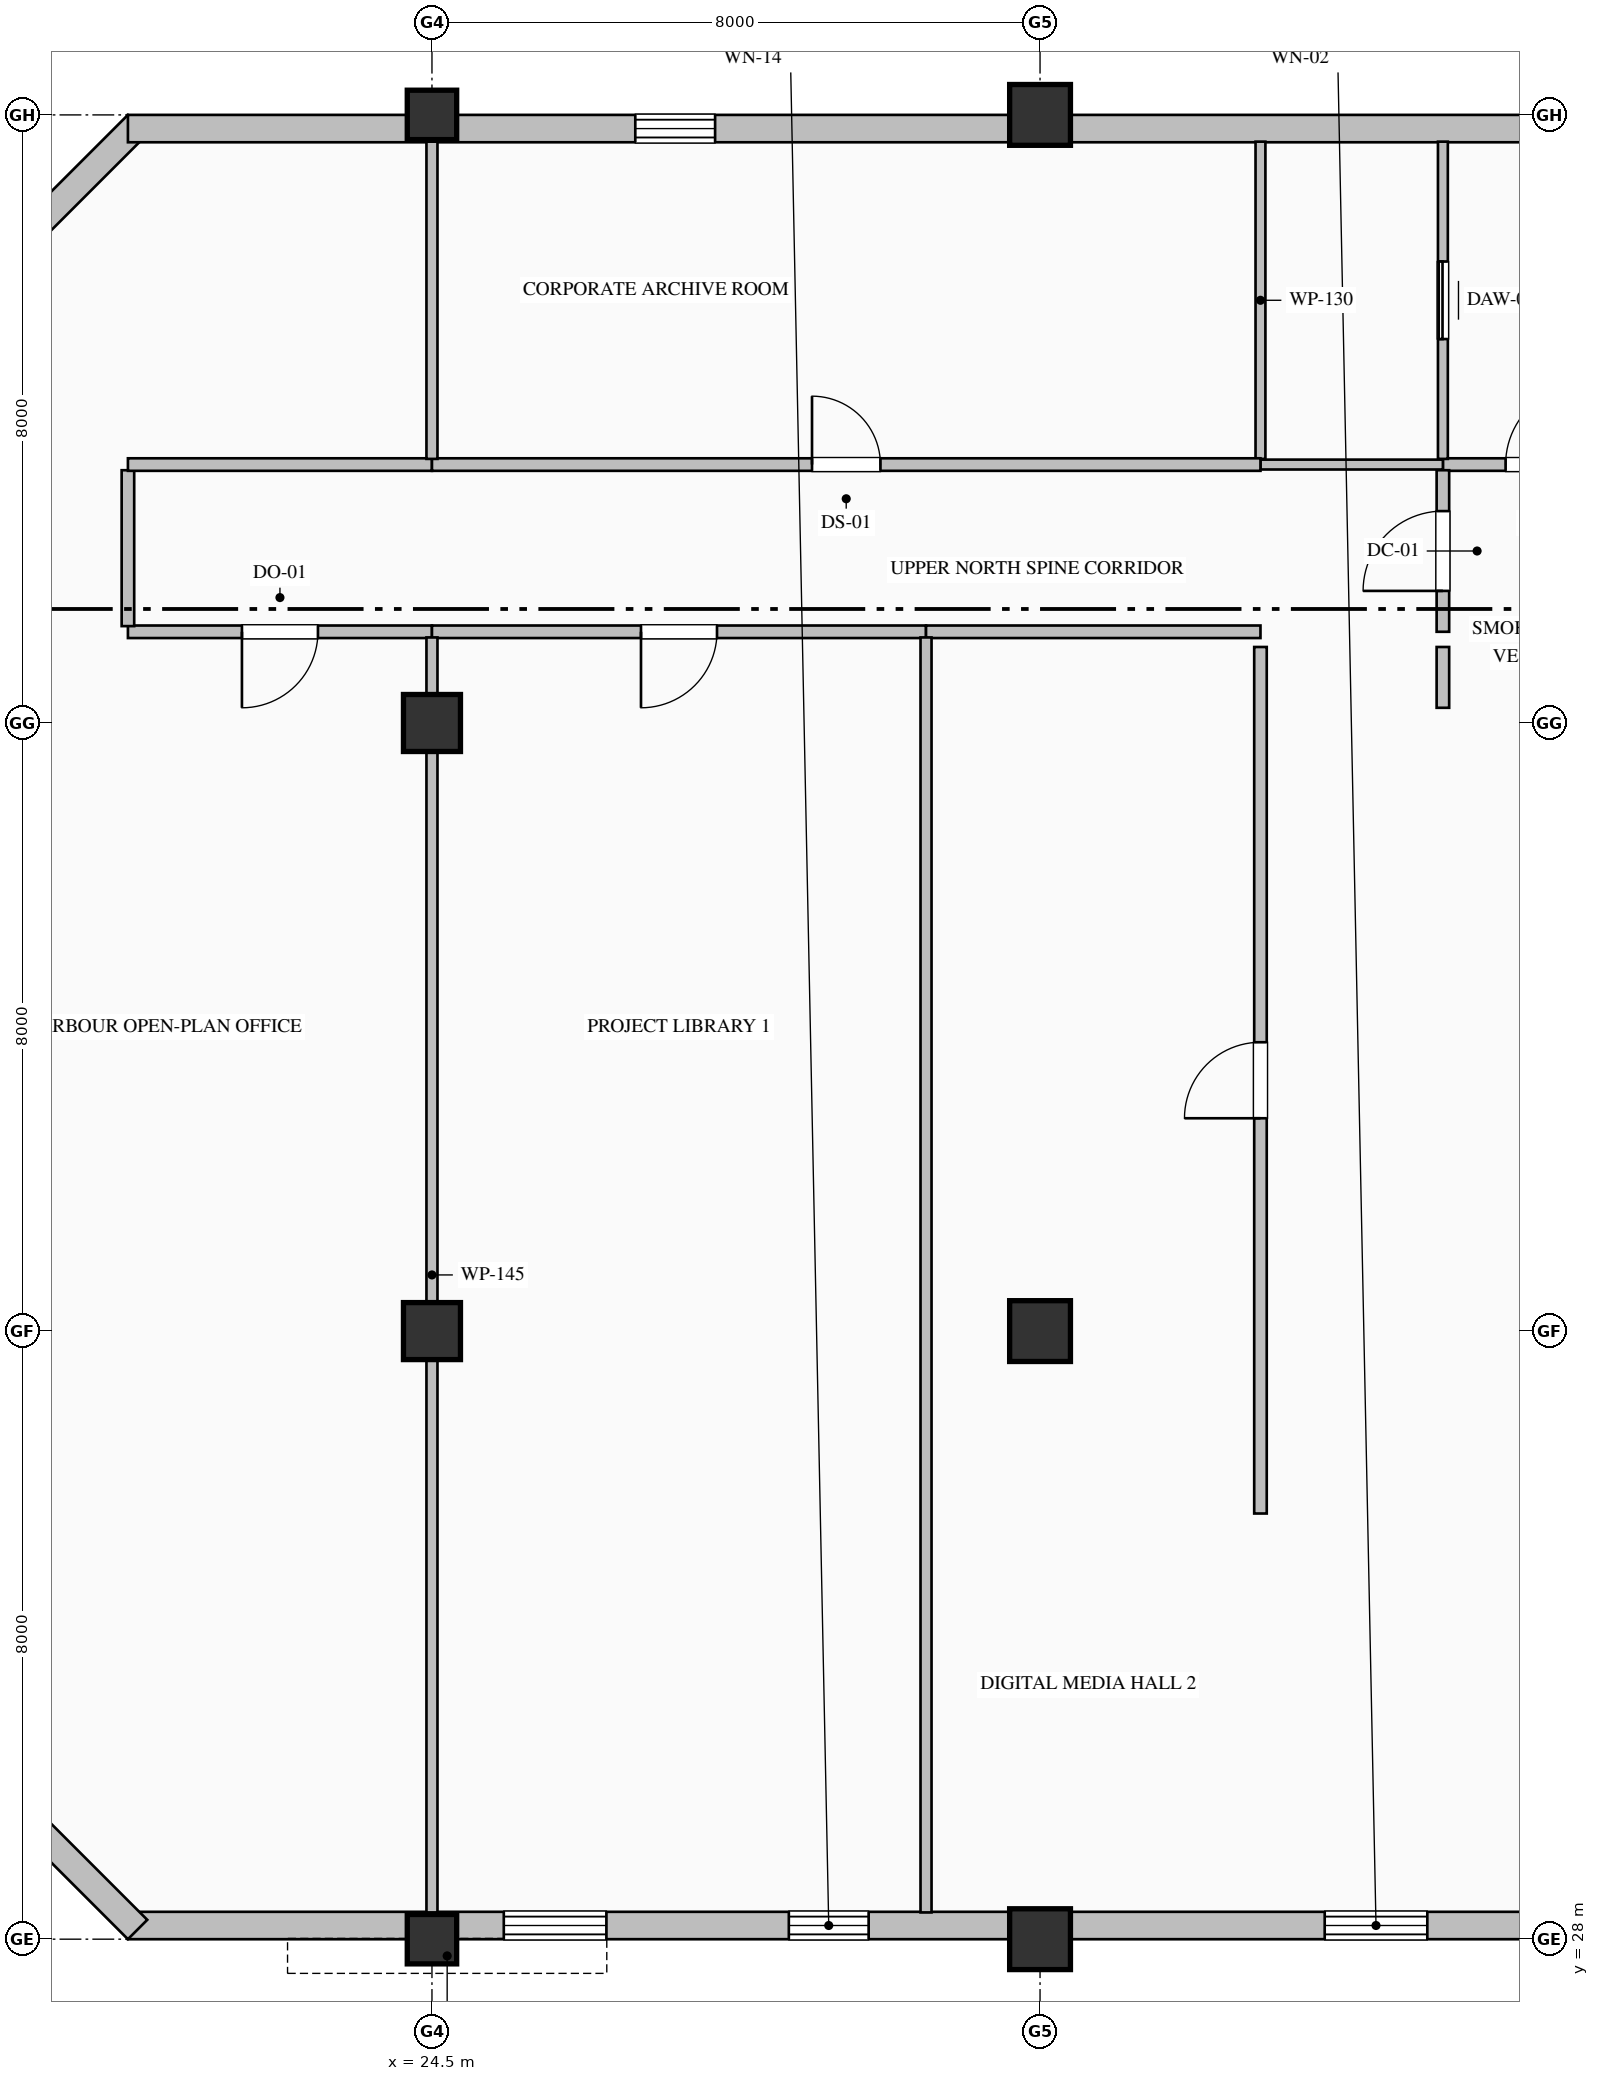
"""IFC4 building model, lengths in metres.
Left out: names, types, materials, properties, quantities, classifications, styles, units other than length and angle.
Written with IfcOpenShell. Run it as: python <this file> out.ifc"""

import sys

from ifc_helpers import new_model, si_unit, direction, frame, frame_2d, origin, origin_2d, place, context, subcontext, project, spatial, rectangle, hollow_rectangle, extrude, element, fill, save


model = new_model("IFC4")
c1 = context("Model", 3, precision=1e-05, world=origin(), true_north=direction((0.0, 1.0)))
c2 = subcontext(c1, "Body", "Model", "MODEL_VIEW")
j1 = project(units=[si_unit("LENGTHUNIT", "METRE"), si_unit("PLANEANGLEUNIT", "RADIAN")], contexts=[c1])
p1 = place(None, origin())
s1 = spatial("IfcSite", under=j1, at=p1, CompositionType="ELEMENT")
p2 = place(p1, origin())
s2 = spatial("IfcBuilding", under=s1, at=p2, CompositionType="ELEMENT")
p3 = place(p2, frame((0.0, 0.0, 315.2)))
s3 = spatial("IfcBuildingStorey", under=s2, at=p3, CompositionType="ELEMENT", Elevation=315.2)
p4 = place(p3, frame((24.5, 28.0, 0.0), z_axis=(0.0, 0.0, 1.0), x_axis=(1.0, 0.0, 0.0)))
e1 = element("IfcColumn", 1, at=p4, inside=s3, PredefinedType="COLUMN", context=c2, shape_type="SweptSolid", body=[
    extrude(hollow_rectangle(XDim=0.65, YDim=0.65, WallThickness=0.028, at=origin_2d()), origin(), (0.0, 0.0, 1.0), 4.0),
])
for number, where, z_axis, x_axis in (
    (2, (24.5, 36.0, 0.0), (0.0, 0.0, 1.0), (1.0, 0.0, 0.0)),
    (3, (24.5, 44.0, 0.0), (0.0, 0.0, 1.0), (1.0, 0.0, 0.0)),
):
    element("IfcColumn", number, at=place(p3, frame(where, z_axis=z_axis, x_axis=x_axis)), inside=s3, PredefinedType="COLUMN", context=c2, shape_type="SweptSolid", body=[
        extrude(rectangle(XDim=0.75, YDim=0.75, at=origin_2d()), origin(), (0.0, 0.0, 1.0), 4.0),
    ])
p5 = place(p3, frame((24.5, 52.0, 0.0), z_axis=(0.0, 0.0, 1.0), x_axis=(1.0, 0.0, 0.0)))
e4 = element("IfcColumn", 4, at=p5, inside=s3, PredefinedType="COLUMN", context=c2, shape_type="SweptSolid", body=[
    extrude(hollow_rectangle(XDim=0.65, YDim=0.65, WallThickness=0.028, at=origin_2d()), origin(), (0.0, 0.0, 1.0), 4.0),
])
for number, where, z_axis, x_axis in (
    (5, (32.5, 28.0, 0.0), (0.0, 0.0, 1.0), (1.0, 0.0, 0.0)),
    (6, (32.5, 36.0, 0.0), (0.0, 0.0, 1.0), (1.0, 0.0, 0.0)),
    (7, (32.5, 52.0, 0.0), (0.0, 0.0, 1.0), (1.0, 0.0, 0.0)),
):
    element("IfcColumn", number, at=place(p3, frame(where, z_axis=z_axis, x_axis=x_axis)), inside=s3, PredefinedType="COLUMN", context=c2, shape_type="SweptSolid", body=[
        extrude(hollow_rectangle(XDim=0.8, YDim=0.8, WallThickness=0.032, at=origin_2d()), origin(), (0.0, 0.0, 1.0), 4.0),
    ])
p6 = place(p3, frame((40.52, 28.18, 0.0), z_axis=(0.0, 0.0, 1.0), x_axis=(-1.0, 0.0, 0.0)))
e8 = element("IfcWall", 8, at=p6, inside=s3, PredefinedType="SOLIDWALL", context=c2, shape_type="SweptSolid", body=[
    extrude(rectangle(XDim=20.02, YDim=0.36, at=frame_2d((10.01, 0.0))), origin(), (0.0, 0.0, 1.0), 3.185),
])
p7 = place(p6, frame((2.925, 0.0, 0.9)))
e9 = element("IfcOpeningElement", 9, at=p7, cuts=e8, PredefinedType="OPENING", context=c2, shape_type="SweptSolid", body=[
    extrude(rectangle(XDim=1.35, YDim=1.85, at=frame_2d((0.675, 0.925))), frame((0.0, 0.19, 0.0), z_axis=(0.0, -1.0, 0.0), x_axis=(1.0, 0.0, 0.0)), (0.0, 0.0, 1.0), 0.38),
])
p8 = place(p6, frame((10.275, 0.0, 0.8)))
e10 = element("IfcOpeningElement", 10, at=p8, cuts=e8, PredefinedType="OPENING", context=c2, shape_type="SweptSolid", body=[
    extrude(rectangle(XDim=1.05, YDim=2.15, at=frame_2d((0.525, 1.075))), frame((0.0, 0.19, 0.0), z_axis=(0.0, -1.0, 0.0), x_axis=(1.0, 0.0, 0.0)), (0.0, 0.0, 1.0), 0.38),
])
p9 = place(p6, frame((13.725, 0.0, 0.9)))
e11 = element("IfcOpeningElement", 11, at=p9, cuts=e8, PredefinedType="OPENING", context=c2, shape_type="SweptSolid", body=[
    extrude(rectangle(XDim=1.35, YDim=1.85, at=frame_2d((0.675, 0.925))), frame((0.0, 0.19, 0.0), z_axis=(0.0, -1.0, 0.0), x_axis=(1.0, 0.0, 0.0)), (0.0, 0.0, 1.0), 0.38),
])
for number, where, z_axis, x_axis in (
    (12, (20.627, 28.127, 0.0), (0.0, 0.0, 1.0), (-0.707, 0.707, 0.0)),
    (13, (16.627, 47.873, 0.0), (0.0, 0.0, 1.0), (0.707, 0.707, 0.0)),
):
    element("IfcWall", number, at=place(p3, frame(where, z_axis=z_axis, x_axis=x_axis)), inside=s3, PredefinedType="SOLIDWALL", context=c2, shape_type="SweptSolid", body=[
        extrude(rectangle(XDim=5.657, YDim=0.36, at=frame_2d((2.828, 0.0))), origin(), (0.0, 0.0, 1.0), 3.785),
    ])
p10 = place(p3, frame((20.5, 51.82, 0.0), z_axis=(0.0, 0.0, 1.0), x_axis=(1.0, 0.0, 0.0)))
e14 = element("IfcWall", 14, at=p10, inside=s3, PredefinedType="SOLIDWALL", context=c2, shape_type="SweptSolid", body=[
    extrude(rectangle(XDim=20.02, YDim=0.36, at=frame_2d((10.01, 0.0))), origin(), (0.0, 0.0, 1.0), 3.335),
])
p11 = place(p10, frame((6.675, 0.0, 0.8)))
e15 = element("IfcOpeningElement", 15, at=p11, cuts=e14, PredefinedType="OPENING", context=c2, shape_type="SweptSolid", body=[
    extrude(rectangle(XDim=1.05, YDim=2.15, at=frame_2d((0.525, 1.075))), frame((0.0, 0.19, 0.0), z_axis=(0.0, -1.0, 0.0), x_axis=(1.0, 0.0, 0.0)), (0.0, 0.0, 1.0), 0.38),
])
p12 = place(p3, frame((37.8, 47.4, 0.0), z_axis=(0.0, 0.0, 1.0), x_axis=(1.0, 0.0, 0.0)))
e16 = element("IfcWall", 16, at=p12, inside=s3, PredefinedType="PARTITIONING", context=c2, shape_type="SweptSolid", body=[
    extrude(rectangle(XDim=2.7, YDim=0.165, at=frame_2d((1.35, 0.0))), origin(), (0.0, 0.0, 1.0), 3.785),
])
p13 = place(p12, frame((0.825, 0.0, 0.0)))
e17 = element("IfcOpeningElement", 17, at=p13, cuts=e16, PredefinedType="OPENING", context=c2, shape_type="SweptSolid", body=[
    extrude(rectangle(XDim=1.05, YDim=2.15, at=frame_2d((0.525, 1.075))), frame((0.0, 0.093, 0.0), z_axis=(0.0, -1.0, 0.0), x_axis=(1.0, 0.0, 0.0)), (0.0, 0.0, 1.0), 0.185),
])
p14 = place(p3, frame((37.8, 45.2, 0.0), z_axis=(0.0, 0.0, 1.0), x_axis=(0.0, 1.0, 0.0)))
e18 = element("IfcWall", 18, at=p14, inside=s3, PredefinedType="PARTITIONING", context=c2, shape_type="SweptSolid", body=[
    extrude(rectangle(XDim=2.125, YDim=0.165, at=frame_2d((1.063, 0.0))), origin(), (0.0, 0.0, 1.0), 3.785),
])
p15 = place(p14, frame((0.538, 0.0, 0.0)))
e19 = element("IfcOpeningElement", 19, at=p15, cuts=e18, PredefinedType="OPENING", context=c2, shape_type="SweptSolid", body=[
    extrude(rectangle(XDim=1.05, YDim=2.15, at=frame_2d((0.525, 1.075))), frame((0.0, 0.093, 0.0), z_axis=(0.0, -1.0, 0.0), x_axis=(1.0, 0.0, 0.0)), (0.0, 0.0, 1.0), 0.185),
])
p16 = place(p3, frame((37.8, 44.2, 0.0), z_axis=(0.0, 0.0, 1.0), x_axis=(0.0, 1.0, 0.0)))
e20 = element("IfcWall", 20, at=p16, inside=s3, PredefinedType="PARTITIONING", context=c2, shape_type="SweptSolid", body=[
    extrude(rectangle(XDim=0.8, YDim=0.165, at=frame_2d((0.4, 0.0))), origin(), (0.0, 0.0, 1.0), 3.785),
])
p17 = place(p3, frame((37.8, 47.475, 0.0), z_axis=(0.0, 0.0, 1.0), x_axis=(0.0, 1.0, 0.0)))
e21 = element("IfcWall", 21, at=p17, inside=s3, PredefinedType="PARTITIONING", context=c2, shape_type="SweptSolid", body=[
    extrude(rectangle(XDim=4.173, YDim=0.13, at=frame_2d((2.087, 0.0))), origin(), (0.0, 0.0, 1.0), 3.785),
])
p18 = place(p17, frame((1.577, 0.0, 0.0)))
e22 = element("IfcOpeningElement", 22, at=p18, cuts=e21, PredefinedType="OPENING", context=c2, shape_type="SweptSolid", body=[
    extrude(rectangle(XDim=1.02, YDim=2.15, at=frame_2d((0.51, 1.075))), frame((0.0, 0.075, 0.0), z_axis=(0.0, -1.0, 0.0), x_axis=(1.0, 0.0, 0.0)), (0.0, 0.0, 1.0), 0.15),
])
p19 = place(p3, frame((37.8, 47.4, 0.0), z_axis=(0.0, 0.0, 1.0), x_axis=(-1.0, 0.0, 0.0)))
e23 = element("IfcWall", 23, at=p19, inside=s3, PredefinedType="PARTITIONING", context=c2, shape_type="SweptSolid", body=[
    extrude(rectangle(XDim=2.4, YDim=0.13, at=frame_2d((1.2, 0.0))), origin(), (0.0, 0.0, 1.0), 3.785),
])
p20 = place(p3, frame((35.4, 47.475, 0.0), z_axis=(0.0, 0.0, 1.0), x_axis=(0.0, 1.0, 0.0)))
e24 = element("IfcWall", 24, at=p20, inside=s3, PredefinedType="PARTITIONING", context=c2, shape_type="SweptSolid", body=[
    extrude(rectangle(XDim=4.173, YDim=0.13, at=frame_2d((2.087, 0.0))), origin(), (0.0, 0.0, 1.0), 3.785),
])
p21 = place(p3, frame((24.5, 45.2, 0.0), z_axis=(0.0, 0.0, 1.0), x_axis=(-1.0, 0.0, 0.0)))
e25 = element("IfcWall", 25, at=p21, inside=s3, PredefinedType="PARTITIONING", context=c2, shape_type="SweptSolid", body=[
    extrude(rectangle(XDim=4.0, YDim=0.165, at=frame_2d((2.0, 0.0))), origin(), (0.0, 0.0, 1.0), 3.785),
])
p22 = place(p21, frame((1.5, 0.0, 0.0)))
e26 = element("IfcOpeningElement", 26, at=p22, cuts=e25, PredefinedType="OPENING", context=c2, shape_type="SweptSolid", body=[
    extrude(rectangle(XDim=1.0, YDim=2.15, at=frame_2d((0.5, 1.075))), frame((0.0, 0.093, 0.0), z_axis=(0.0, -1.0, 0.0), x_axis=(1.0, 0.0, 0.0)), (0.0, 0.0, 1.0), 0.185),
])
p23 = place(p3, frame((20.5, 45.274, 0.0), z_axis=(0.0, 0.0, 1.0), x_axis=(0.0, 1.0, 0.0)))
e27 = element("IfcWall", 27, at=p23, inside=s3, PredefinedType="PARTITIONING", context=c2, shape_type="SweptSolid", body=[
    extrude(rectangle(XDim=2.051, YDim=0.165, at=frame_2d((1.025, 0.0))), origin(), (0.0, 0.0, 1.0), 3.785),
])
p24 = place(p3, frame((20.5, 47.4, 0.0), z_axis=(0.0, 0.0, 1.0), x_axis=(1.0, 0.0, 0.0)))
e28 = element("IfcWall", 28, at=p24, inside=s3, PredefinedType="PARTITIONING", context=c2, shape_type="SweptSolid", body=[
    extrude(rectangle(XDim=4.0, YDim=0.165, at=frame_2d((2.0, 0.0))), origin(), (0.0, 0.0, 1.0), 3.785),
])
p25 = place(p3, frame((24.5, 47.4, 0.0), z_axis=(0.0, 0.0, 1.0), x_axis=(1.0, 0.0, 0.0)))
e29 = element("IfcWall", 29, at=p25, inside=s3, PredefinedType="PARTITIONING", context=c2, shape_type="SweptSolid", body=[
    extrude(rectangle(XDim=10.9, YDim=0.165, at=frame_2d((5.45, 0.0))), origin(), (0.0, 0.0, 1.0), 3.785),
])
p26 = place(p25, frame((5.0, 0.0, 0.0)))
e30 = element("IfcOpeningElement", 30, at=p26, cuts=e29, PredefinedType="OPENING", context=c2, shape_type="SweptSolid", body=[
    extrude(rectangle(XDim=0.9, YDim=2.15, at=frame_2d((0.45, 1.075))), frame((0.0, 0.093, 0.0), z_axis=(0.0, -1.0, 0.0), x_axis=(1.0, 0.0, 0.0)), (0.0, 0.0, 1.0), 0.185),
])
p27 = place(p3, frame((31.0, 45.2, 0.0), z_axis=(0.0, 0.0, 1.0), x_axis=(-1.0, 0.0, 0.0)))
e31 = element("IfcWall", 31, at=p27, inside=s3, PredefinedType="PARTITIONING", context=c2, shape_type="SweptSolid", body=[
    extrude(rectangle(XDim=6.5, YDim=0.165, at=frame_2d((3.25, 0.0))), origin(), (0.0, 0.0, 1.0), 3.785),
])
p28 = place(p27, frame((2.75, 0.0, 0.0)))
e32 = element("IfcOpeningElement", 32, at=p28, cuts=e31, PredefinedType="OPENING", context=c2, shape_type="SweptSolid", body=[
    extrude(rectangle(XDim=1.0, YDim=2.15, at=frame_2d((0.5, 1.075))), frame((0.0, 0.093, 0.0), z_axis=(0.0, -1.0, 0.0), x_axis=(1.0, 0.0, 0.0)), (0.0, 0.0, 1.0), 0.185),
])
p29 = place(p3, frame((35.4, 45.2, 0.0), z_axis=(0.0, 0.0, 1.0), x_axis=(-1.0, 0.0, 0.0)))
e33 = element("IfcWall", 33, at=p29, inside=s3, PredefinedType="PARTITIONING", context=c2, shape_type="SweptSolid", body=[
    extrude(rectangle(XDim=4.4, YDim=0.165, at=frame_2d((2.2, 0.0))), origin(), (0.0, 0.0, 1.0), 3.785),
])
p30 = place(p3, frame((35.4, 33.6, 0.0), z_axis=(0.0, 0.0, 1.0), x_axis=(0.0, 1.0, 0.0)))
e34 = element("IfcWall", 34, at=p30, inside=s3, PredefinedType="PARTITIONING", context=c2, shape_type="SweptSolid", body=[
    extrude(rectangle(XDim=11.4, YDim=0.165, at=frame_2d((5.7, 0.0))), origin(), (0.0, 0.0, 1.0), 3.785),
])
p31 = place(p30, frame((5.2, 0.0, 0.0)))
e35 = element("IfcOpeningElement", 35, at=p31, cuts=e34, PredefinedType="OPENING", context=c2, shape_type="SweptSolid", body=[
    extrude(rectangle(XDim=1.0, YDim=2.15, at=frame_2d((0.5, 1.075))), frame((0.0, 0.093, 0.0), z_axis=(0.0, -1.0, 0.0), x_axis=(1.0, 0.0, 0.0)), (0.0, 0.0, 1.0), 0.185),
])
p32 = place(p3, frame((24.5, 51.648, 0.0), z_axis=(0.0, 0.0, 1.0), x_axis=(0.0, -1.0, 0.0)))
e36 = element("IfcWall", 36, at=p32, inside=s3, PredefinedType="PARTITIONING", context=c2, shape_type="SweptSolid", body=[
    extrude(rectangle(XDim=4.173, YDim=0.145, at=frame_2d((2.087, 0.0))), origin(), (0.0, 0.0, 1.0), 3.177),
])
p33 = place(p3, frame((24.5, 45.125, 0.0), z_axis=(0.0, 0.0, 1.0), x_axis=(0.0, -1.0, 0.0)))
e37 = element("IfcWall", 37, at=p33, inside=s3, PredefinedType="PARTITIONING", context=c2, shape_type="SweptSolid", body=[
    extrude(rectangle(XDim=16.773, YDim=0.145, at=frame_2d((8.387, 0.0))), origin(), (0.0, 0.0, 1.0), 3.177),
])
p34 = place(p3, frame((31.0, 45.125, 0.0), z_axis=(0.0, 0.0, 1.0), x_axis=(0.0, -1.0, 0.0)))
e38 = element("IfcWall", 38, at=p34, inside=s3, PredefinedType="PARTITIONING", context=c2, shape_type="SweptSolid", body=[
    extrude(rectangle(XDim=16.773, YDim=0.145, at=frame_2d((8.387, 0.0))), origin(), (0.0, 0.0, 1.0), 3.785),
])
p35 = place(p7, origin())
e39 = element("IfcWindow", 39, at=p35, inside=s3, PartitioningType="DOUBLE_PANEL_VERTICAL", PredefinedType="WINDOW", context=c2, shape_type="SweptSolid", body=[
    extrude(rectangle(XDim=1.35, YDim=1.85, at=frame_2d((0.675, 0.925))), frame((0.0, 0.15, 0.0), z_axis=(0.0, -1.0, 0.0), x_axis=(1.0, 0.0, 0.0)), (0.0, 0.0, 1.0), 0.06),
])
fill(e9, e39)
p36 = place(p8, origin())
e40 = element("IfcWindow", 40, at=p36, inside=s3, PartitioningType="SINGLE_PANEL", PredefinedType="WINDOW", context=c2, shape_type="SweptSolid", body=[
    extrude(rectangle(XDim=1.05, YDim=2.15, at=frame_2d((0.525, 1.075))), frame((0.0, 0.15, 0.0), z_axis=(0.0, -1.0, 0.0), x_axis=(1.0, 0.0, 0.0)), (0.0, 0.0, 1.0), 0.06),
])
fill(e10, e40)
p37 = place(p9, origin())
e41 = element("IfcWindow", 41, at=p37, inside=s3, PartitioningType="DOUBLE_PANEL_VERTICAL", PredefinedType="WINDOW", context=c2, shape_type="SweptSolid", body=[
    extrude(rectangle(XDim=1.35, YDim=1.85, at=frame_2d((0.675, 0.925))), frame((0.0, 0.15, 0.0), z_axis=(0.0, -1.0, 0.0), x_axis=(1.0, 0.0, 0.0)), (0.0, 0.0, 1.0), 0.06),
])
fill(e11, e41)
p38 = place(p11, origin())
e42 = element("IfcWindow", 42, at=p38, inside=s3, PartitioningType="SINGLE_PANEL", PredefinedType="WINDOW", context=c2, shape_type="SweptSolid", body=[
    extrude(rectangle(XDim=1.05, YDim=2.15, at=frame_2d((0.525, 1.075))), frame((0.0, 0.15, 0.0), z_axis=(0.0, -1.0, 0.0), x_axis=(1.0, 0.0, 0.0)), (0.0, 0.0, 1.0), 0.06),
])
fill(e15, e42)
p39 = place(p13, origin())
e43 = element("IfcDoor", 43, at=p39, inside=s3, OperationType="SINGLE_SWING_RIGHT", PredefinedType="DOOR", context=c2, shape_type="SweptSolid", body=[
    extrude(rectangle(XDim=1.05, YDim=2.15, at=frame_2d((0.525, 1.075))), frame((0.0, 0.025, 0.0), z_axis=(0.0, -1.0, 0.0), x_axis=(1.0, 0.0, 0.0)), (0.0, 0.0, 1.0), 0.05),
])
fill(e17, e43)
p40 = place(p15, origin())
e44 = element("IfcDoor", 44, at=p40, inside=s3, OperationType="SINGLE_SWING_LEFT", PredefinedType="DOOR", context=c2, shape_type="SweptSolid", body=[
    extrude(rectangle(XDim=1.05, YDim=2.15, at=frame_2d((0.525, 1.075))), frame((0.0, 0.025, 0.0), z_axis=(0.0, -1.0, 0.0), x_axis=(1.0, 0.0, 0.0)), (0.0, 0.0, 1.0), 0.05),
])
fill(e19, e44)
p41 = place(p18, origin())
e45 = element("IfcDoor", 45, at=p41, inside=s3, OperationType="SLIDING_TO_LEFT", PredefinedType="DOOR", context=c2, shape_type="SweptSolid", body=[
    extrude(rectangle(XDim=1.02, YDim=2.15, at=frame_2d((0.51, 1.075))), frame((0.0, 0.025, 0.0), z_axis=(0.0, -1.0, 0.0), x_axis=(1.0, 0.0, 0.0)), (0.0, 0.0, 1.0), 0.05),
])
fill(e22, e45)
p42 = place(p22, origin())
e46 = element("IfcDoor", 46, at=p42, inside=s3, OperationType="SINGLE_SWING_RIGHT", PredefinedType="DOOR", context=c2, shape_type="SweptSolid", body=[
    extrude(rectangle(XDim=1.0, YDim=2.15, at=frame_2d((0.5, 1.075))), frame((0.0, 0.025, 0.0), z_axis=(0.0, -1.0, 0.0), x_axis=(1.0, 0.0, 0.0)), (0.0, 0.0, 1.0), 0.05),
])
fill(e26, e46)
p43 = place(p26, origin())
e47 = element("IfcDoor", 47, at=p43, inside=s3, OperationType="SINGLE_SWING_LEFT", PredefinedType="DOOR", context=c2, shape_type="SweptSolid", body=[
    extrude(rectangle(XDim=0.9, YDim=2.15, at=frame_2d((0.45, 1.075))), frame((0.0, 0.025, 0.0), z_axis=(0.0, -1.0, 0.0), x_axis=(1.0, 0.0, 0.0)), (0.0, 0.0, 1.0), 0.05),
])
fill(e30, e47)
p44 = place(p28, origin())
e48 = element("IfcDoor", 48, at=p44, inside=s3, OperationType="SINGLE_SWING_RIGHT", PredefinedType="DOOR", context=c2, shape_type="SweptSolid", body=[
    extrude(rectangle(XDim=1.0, YDim=2.15, at=frame_2d((0.5, 1.075))), frame((0.0, 0.025, 0.0), z_axis=(0.0, -1.0, 0.0), x_axis=(1.0, 0.0, 0.0)), (0.0, 0.0, 1.0), 0.05),
])
fill(e32, e48)
p45 = place(p31, origin())
e49 = element("IfcDoor", 49, at=p45, inside=s3, OperationType="SINGLE_SWING_LEFT", PredefinedType="DOOR", context=c2, shape_type="SweptSolid", body=[
    extrude(rectangle(XDim=1.0, YDim=2.15, at=frame_2d((0.5, 1.075))), frame((0.0, 0.025, 0.0), z_axis=(0.0, -1.0, 0.0), x_axis=(1.0, 0.0, 0.0)), (0.0, 0.0, 1.0), 0.05),
])
fill(e35, e49)
save(model, sys.argv[1])
